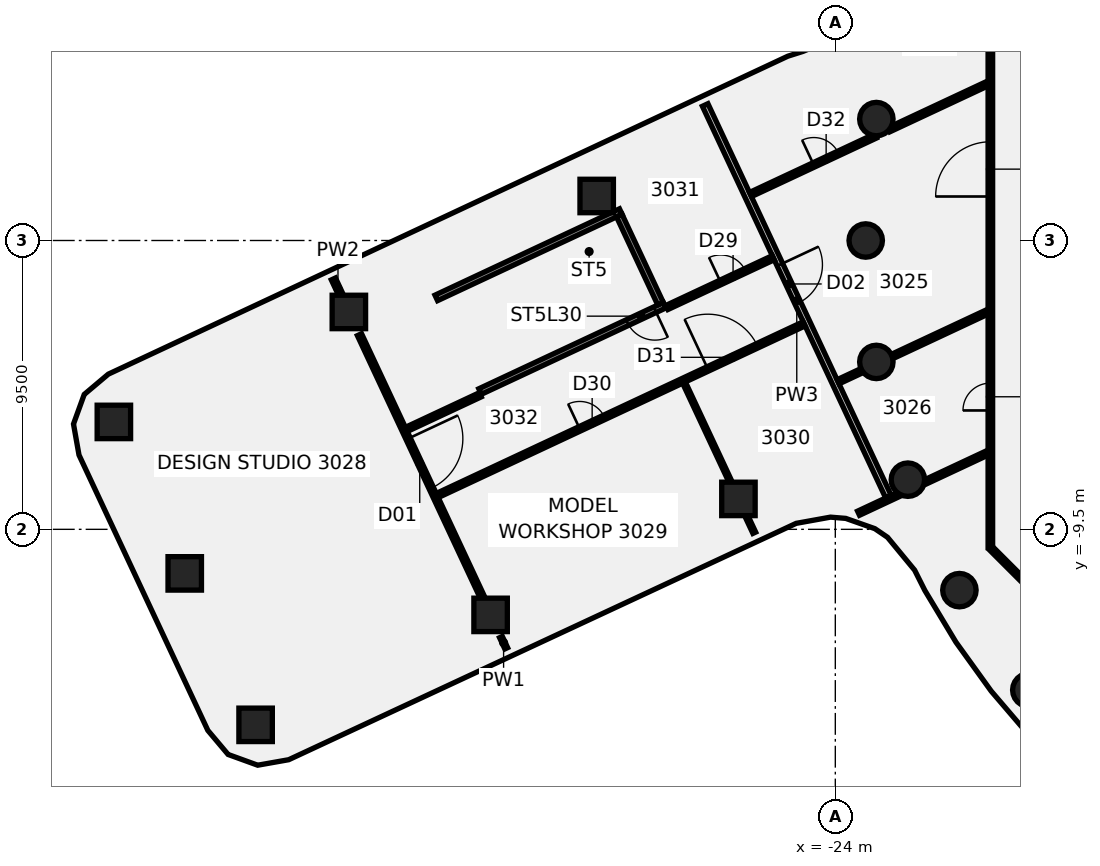
"""IFC4 building model, lengths in metres.
Left out: names, types, materials, properties, quantities, classifications, styles, units other than length and angle.
Written with IfcOpenShell. Run it as: python <this file> out.ifc"""

import sys

from ifc_helpers import new_model, si_unit, direction, frame, frame_2d, origin, origin_2d, place, context, subcontext, project, spatial, polyline, rectangle, circle, outline, extrude, element, fill, save


model = new_model("IFC4")
c1 = context("Model", 3, precision=1e-05, world=origin(), true_north=direction((0.0, 1.0)))
c2 = subcontext(c1, "Body", "Model", "MODEL_VIEW")
j1 = project(units=[si_unit("LENGTHUNIT", "METRE"), si_unit("PLANEANGLEUNIT", "RADIAN")], contexts=[c1])
p1 = place(None, origin())
s1 = spatial("IfcSite", under=j1, at=p1, CompositionType="ELEMENT")
p2 = place(p1, origin())
s2 = spatial("IfcBuilding", under=s1, at=p2, CompositionType="ELEMENT")
p3 = place(p2, frame((0.0, 0.0, 124.75)))
s3 = spatial("IfcBuildingStorey", under=s2, at=p3, CompositionType="ELEMENT", Elevation=124.75)
for number, where, z_axis, x_axis in (
    (1, (-22.651, 3.994, -0.14), (0.0, 0.0, 1.0), (1.0, 0.0, 0.0)),
    (2, (-23.0, 0.0, -0.14), (0.0, 0.0, 1.0), (1.0, 0.0, 0.0)),
    (3, (-22.651, -3.994, -0.14), (0.0, 0.0, 1.0), (1.0, 0.0, 0.0)),
    (4, (-21.613, -7.866, -0.14), (0.0, 0.0, 1.0), (1.0, 0.0, 0.0)),
    (5, (-19.919, -11.5, -0.14), (0.0, 0.0, 1.0), (1.0, 0.0, 0.0)),
    (6, (-17.619, -14.784, -0.14), (0.0, 0.0, 1.0), (1.0, 0.0, 0.0)),
):
    element("IfcColumn", number, at=place(p3, frame(where, z_axis=z_axis, x_axis=x_axis)), inside=s3, PredefinedType="COLUMN", context=c2, shape_type="SweptSolid", body=[
        extrude(circle(Radius=0.55, at=origin_2d()), origin(), (0.0, 0.0, 1.0), 3.71),
    ])
p4 = place(p3, frame((-35.338, -12.314, -0.138), z_axis=(0.060824433029, -0.064699855868, 0.9960493547), x_axis=(-0.421197702581, 0.903035286049, 0.084378714676)))
e7 = element("IfcColumn", 7, at=p4, inside=s3, PredefinedType="COLUMN", context=c2, shape_type="SweptSolid", body=[
    extrude(rectangle(XDim=1.1, YDim=1.1, at=origin_2d()), origin(), (0.0, 0.0, 1.0), 3.717),
])
p5 = place(p3, frame((-40.0, -2.35, -0.138), z_axis=(0.012351142794, -0.088034741194, 0.996040829291), x_axis=(0.905727436668, 0.423052547946, 0.026160125068)))
e8 = element("IfcColumn", 8, at=p5, inside=s3, PredefinedType="COLUMN", context=c2, shape_type="SweptSolid", body=[
    extrude(rectangle(XDim=1.1, YDim=1.1, at=origin_2d()), origin(), (0.0, 0.0, 1.0), 3.716),
])
p6 = place(p3, frame((-27.187, -8.499, -0.139), z_axis=(0.041932325564, -0.025080401947, 0.998805613476), x_axis=(-0.422762183328, 0.905336041768, 0.040481944421)))
e9 = element("IfcColumn", 9, at=p6, inside=s3, PredefinedType="COLUMN", context=c2, shape_type="SweptSolid", body=[
    extrude(rectangle(XDim=1.1, YDim=1.1, at=origin_2d()), origin(), (0.0, 0.0, 1.0), 3.709),
])
p7 = place(p3, frame((-31.849, 1.464, -0.139), z_axis=(-0.00678071338, -0.048386644022, 0.998805664084), x_axis=(0.905990074096, 0.422461295082, 0.026616532396)))
e10 = element("IfcColumn", 10, at=p7, inside=s3, PredefinedType="COLUMN", context=c2, shape_type="SweptSolid", body=[
    extrude(rectangle(XDim=1.1, YDim=1.1, at=origin_2d()), origin(), (0.0, 0.0, 1.0), 3.708),
])
p8 = place(p3, frame((-47.73, -5.967, -0.138), z_axis=(0.019038669148, -0.130588259864, 0.991253870339), x_axis=(0.905941901453, 0.421679598548, 0.038152160609)))
e11 = element("IfcColumn", 11, at=p8, inside=s3, PredefinedType="COLUMN", context=c2, shape_type="SweptSolid", body=[
    extrude(rectangle(XDim=1.1, YDim=1.1, at=origin_2d()), origin(), (0.0, 0.0, 1.0), 3.732),
])
p9 = place(p3, frame((-45.399, -10.949, -0.138), z_axis=(0.043196128411, -0.119116596528, 0.991940185153), x_axis=(0.905970442825, 0.423188341029, 0.011365946715)))
e12 = element("IfcColumn", 12, at=p9, inside=s3, PredefinedType="COLUMN", context=c2, shape_type="SweptSolid", body=[
    extrude(rectangle(XDim=1.1, YDim=1.1, at=origin_2d()), origin(), (0.0, 0.0, 1.0), 3.73),
])
p10 = place(p3, frame((-43.068, -15.93, -0.138), z_axis=(0.067336464177, -0.107515850964, 0.991920431478), x_axis=(-0.419376139534, 0.899037513011, 0.125917448308)))
e13 = element("IfcColumn", 13, at=p10, inside=s3, PredefinedType="COLUMN", context=c2, shape_type="SweptSolid", body=[
    extrude(rectangle(XDim=1.1, YDim=1.1, at=origin_2d()), origin(), (0.0, 0.0, 1.0), 3.731),
])
p11 = place(p3, frame((-40.509, -1.264, 0.0), z_axis=(0.0, 0.0, 1.0), x_axis=(0.423771735818, -0.905769019078, 0.0)))
e14 = element("IfcWall", 14, at=p11, inside=s3, PredefinedType="PARTITIONING", context=c2, shape_type="SweptSolid", body=[
    extrude(rectangle(XDim=0.709, YDim=0.15, at=frame_2d((0.354, 0.0))), origin(), (0.0, 0.0, 1.0), 2.97),
])
p12 = place(p3, frame((-39.651, -3.097, 0.0), z_axis=(0.0, 0.0, 1.0), x_axis=(0.423775684495, -0.905767171646, 0.0)))
e15 = element("IfcWall", 15, at=p12, inside=s3, PredefinedType="PARTITIONING", context=c2, shape_type="SweptSolid", body=[
    extrude(rectangle(XDim=9.667, YDim=0.15, at=frame_2d((4.833, 0.0))), origin(), (0.0, 0.0, 1.0), 2.87),
])
p13 = place(p12, frame((3.776, 0.0, 0.0)))
e16 = element("IfcOpeningElement", 16, at=p13, cuts=e15, PredefinedType="OPENING", context=c2, shape_type="SweptSolid", body=[
    extrude(rectangle(XDim=1.8, YDim=2.1, at=frame_2d((0.9, 1.05))), frame((0.0, 0.085, 0.0), z_axis=(0.0, -1.0, 0.0), x_axis=(1.0, 0.0, 0.0)), (0.0, 0.0, 1.0), 0.17),
])
p14 = place(p3, frame((-34.998, -13.043, 0.0), z_axis=(0.0, 0.0, 1.0), x_axis=(0.423605928127, -0.905846575119, 0.0)))
e17 = element("IfcWall", 17, at=p14, inside=s3, PredefinedType="PARTITIONING", context=c2, shape_type="SweptSolid", body=[
    extrude(rectangle(XDim=0.408, YDim=0.1, at=frame_2d((0.204, 0.0))), origin(), (0.0, 0.0, 1.0), 2.97),
])
p15 = place(p3, frame((-28.977, -4.673, 0.0), z_axis=(0.0, 0.0, 1.0), x_axis=(0.423841599809, -0.905736329332, 0.0)))
e18 = element("IfcWall", 18, at=p15, inside=s3, PredefinedType="PARTITIONING", context=c2, shape_type="SweptSolid", body=[
    extrude(rectangle(XDim=3.634, YDim=0.1, at=frame_2d((1.817, 0.0))), origin(), (0.0, 0.0, 1.0), 2.97),
])
p16 = place(p3, frame((-26.88, -9.155, 0.0), z_axis=(0.0, 0.0, 1.0), x_axis=(0.423519130121, -0.905887159872, 0.0)))
e19 = element("IfcWall", 19, at=p16, inside=s3, PredefinedType="PARTITIONING", context=c2, shape_type="SweptSolid", body=[
    extrude(rectangle(XDim=0.506, YDim=0.1, at=frame_2d((0.253, 0.0))), origin(), (0.0, 0.0, 1.0), 2.97),
])
p17 = place(p3, frame((-28.281, 4.457, 0.0), z_axis=(0.0, 0.0, 1.0), x_axis=(0.423799855828, -0.90575586236, 0.0)))
e20 = element("IfcWall", 20, at=p17, inside=s3, PredefinedType="PARTITIONING", context=c2, shape_type="SweptSolid", body=[
    extrude(rectangle(XDim=14.219, YDim=0.2, at=frame_2d((7.109, 0.0))), origin(), (0.0, 0.0, 1.0), 2.87),
])
p18 = place(p17, frame((5.8, 0.0, 0.0)))
e21 = element("IfcOpeningElement", 21, at=p18, cuts=e20, PredefinedType="OPENING", context=c2, shape_type="SweptSolid", body=[
    extrude(rectangle(XDim=1.4, YDim=2.1, at=frame_2d((0.7, 1.05))), frame((0.0, 0.11, 0.0), z_axis=(0.0, -1.0, 0.0), x_axis=(1.0, 0.0, 0.0)), (0.0, 0.0, 1.0), 0.22),
])
p19 = place(p3, frame((-18.872, -10.128, 0.0), z_axis=(0.0, 0.0, 1.0), x_axis=(0.707106781187, -0.707106781187, 0.0)))
e22 = element("IfcWall", 22, at=p19, inside=s3, PredefinedType="PARTITIONING", context=c2, shape_type="SweptSolid", body=[
    extrude(rectangle(XDim=2.465, YDim=0.15, at=frame_2d((1.232, 0.0))), origin(), (0.0, 0.0, 1.0), 2.97),
])
p20 = place(p3, frame((-38.11, -6.213, 0.0), z_axis=(0.0, 0.0, 1.0), x_axis=(0.905797160648, 0.423711580869, 0.0)))
e23 = element("IfcWall", 23, at=p20, inside=s3, PredefinedType="PARTITIONING", context=c2, shape_type="SweptSolid", body=[
    extrude(rectangle(XDim=2.685, YDim=0.15, at=frame_2d((1.343, 0.0))), origin(), (0.0, 0.0, 1.0), 2.87),
])
p21 = place(p3, frame((-29.537, -2.202, 0.0), z_axis=(0.0, 0.0, 1.0), x_axis=(0.905762554572, 0.423785552768, 0.0)))
e24 = element("IfcWall", 24, at=p21, inside=s3, PredefinedType="PARTITIONING", context=c2, shape_type="SweptSolid", body=[
    extrude(rectangle(XDim=3.86, YDim=0.15, at=frame_2d((1.93, 0.0))), origin(), (0.0, 0.0, 1.0), 2.87),
])
p22 = place(p21, frame((1.95, 0.0, 0.0)))
e25 = element("IfcOpeningElement", 25, at=p22, cuts=e24, PredefinedType="OPENING", context=c2, shape_type="SweptSolid", body=[
    extrude(rectangle(XDim=0.9, YDim=2.1, at=frame_2d((0.45, 1.05))), frame((0.0, 0.085, 0.0), z_axis=(0.0, -1.0, 0.0), x_axis=(1.0, 0.0, 0.0)), (0.0, 0.0, 1.0), 0.17),
])
p23 = place(p3, frame((-37.093, -8.387, 0.0), z_axis=(0.0, 0.0, 1.0), x_axis=(0.905765973865, 0.423778244591, 0.0)))
e26 = element("IfcWall", 26, at=p23, inside=s3, PredefinedType="PARTITIONING", context=c2, shape_type="SweptSolid", body=[
    extrude(rectangle(XDim=13.321, YDim=0.15, at=frame_2d((6.66, 0.0))), origin(), (0.0, 0.0, 1.0), 2.87),
])
p24 = place(p23, frame((5.175, 0.0, 0.0)))
e27 = element("IfcOpeningElement", 27, at=p24, cuts=e26, PredefinedType="OPENING", context=c2, shape_type="SweptSolid", body=[
    extrude(rectangle(XDim=0.9, YDim=2.1, at=frame_2d((0.45, 1.05))), frame((0.0, 0.085, 0.0), z_axis=(0.0, -1.0, 0.0), x_axis=(1.0, 0.0, 0.0)), (0.0, 0.0, 1.0), 0.17),
])
p25 = place(p23, frame((9.825, 0.0, 0.0)))
e28 = element("IfcOpeningElement", 28, at=p25, cuts=e26, PredefinedType="OPENING", context=c2, shape_type="SweptSolid", body=[
    extrude(rectangle(XDim=1.8, YDim=2.1, at=frame_2d((0.9, 1.05))), frame((0.0, 0.085, 0.0), z_axis=(0.0, -1.0, 0.0), x_axis=(1.0, 0.0, 0.0)), (0.0, 0.0, 1.0), 0.17),
])
p26 = place(p3, frame((-26.788, 1.513, 0.0), z_axis=(0.0, 0.0, 1.0), x_axis=(0.905759991445, 0.42379103093, 0.0)))
e29 = element("IfcWall", 29, at=p26, inside=s3, PredefinedType="PARTITIONING", context=c2, shape_type="SweptSolid", body=[
    extrude(rectangle(XDim=4.545, YDim=0.15, at=frame_2d((2.272, 0.0))), origin(), (0.0, 0.0, 1.0), 2.97),
])
p27 = place(p26, frame((2.295, 0.0, 0.0)))
e30 = element("IfcOpeningElement", 30, at=p27, cuts=e29, PredefinedType="OPENING", context=c2, shape_type="SweptSolid", body=[
    extrude(rectangle(XDim=0.9, YDim=2.1, at=frame_2d((0.45, 1.05))), frame((0.0, 0.085, 0.0), z_axis=(0.0, -1.0, 0.0), x_axis=(1.0, 0.0, 0.0)), (0.0, 0.0, 1.0), 0.17),
])
p28 = place(p3, frame((-22.237, 3.643, 0.0), z_axis=(0.0, 0.0, 1.0), x_axis=(0.905759778977, 0.423791485034, 0.0)))
e31 = element("IfcWall", 31, at=p28, inside=s3, PredefinedType="PARTITIONING", context=c2, shape_type="SweptSolid", body=[
    extrude(rectangle(XDim=3.584, YDim=0.15, at=frame_2d((1.792, 0.0))), origin(), (0.0, 0.0, 1.0), 2.97),
])
p29 = place(p3, frame((-23.906, -4.646, 0.0), z_axis=(0.0, 0.0, 1.0), x_axis=(0.905776114627, 0.423756569473, 0.0)))
e32 = element("IfcWall", 32, at=p29, inside=s3, PredefinedType="PARTITIONING", context=c2, shape_type="SweptSolid", body=[
    extrude(rectangle(XDim=0.859, YDim=0.15, at=frame_2d((0.43, 0.0))), origin(), (0.0, 0.0, 1.0), 2.87),
])
p30 = place(p3, frame((-22.138, -3.818, 0.0), z_axis=(0.0, 0.0, 1.0), x_axis=(0.90574646987, 0.423819929118, 0.0)))
e33 = element("IfcWall", 33, at=p30, inside=s3, PredefinedType="PARTITIONING", context=c2, shape_type="SweptSolid", body=[
    extrude(rectangle(XDim=3.475, YDim=0.15, at=frame_2d((1.737, 0.0))), origin(), (0.0, 0.0, 1.0), 2.97),
])
p31 = place(p3, frame((-23.236, -8.969, 0.0), z_axis=(0.0, 0.0, 1.0), x_axis=(0.905683464585, 0.423954551783, 0.0)))
e34 = element("IfcWall", 34, at=p31, inside=s3, PredefinedType="PARTITIONING", context=c2, shape_type="SweptSolid", body=[
    extrude(rectangle(XDim=1.475, YDim=0.15, at=frame_2d((0.737, 0.0))), origin(), (0.0, 0.0, 1.0), 2.97),
])
p32 = place(p3, frame((-21.078, -7.959, 0.0), z_axis=(0.0, 0.0, 1.0), x_axis=(0.905695418717, 0.423929013533, 0.0)))
e35 = element("IfcWall", 35, at=p32, inside=s3, PredefinedType="PARTITIONING", context=c2, shape_type="SweptSolid", body=[
    extrude(rectangle(XDim=2.305, YDim=0.15, at=frame_2d((1.152, 0.0))), origin(), (0.0, 0.0, 1.0), 2.97),
])
p33 = place(p3, frame((-18.9, -10.1, 0.0), z_axis=(0.0, 0.0, 1.0), x_axis=(0.0, 1.0, 0.0)))
e36 = element("IfcWall", 36, at=p33, inside=s3, PredefinedType="PARTITIONING", context=c2, shape_type="SweptSolid", body=[
    extrude(rectangle(XDim=20.2, YDim=0.15, at=frame_2d((10.1, 0.0))), origin(), (0.0, 0.0, 1.0), 2.97),
])
p34 = place(p33, frame((11.547, 0.0, 0.0)))
e37 = element("IfcOpeningElement", 37, at=p34, cuts=e36, PredefinedType="OPENING", context=c2, shape_type="SweptSolid", body=[
    extrude(rectangle(XDim=1.8, YDim=2.1, at=frame_2d((0.9, 1.05))), frame((0.0, 0.085, 0.0), z_axis=(0.0, -1.0, 0.0), x_axis=(1.0, 0.0, 0.0)), (0.0, 0.0, 1.0), 0.17),
])
p35 = place(p33, frame((4.51, 0.0, 0.0)))
e38 = element("IfcOpeningElement", 38, at=p35, cuts=e36, PredefinedType="OPENING", context=c2, shape_type="SweptSolid", body=[
    extrude(rectangle(XDim=0.9, YDim=2.1, at=frame_2d((0.45, 1.05))), frame((0.0, 0.085, 0.0), z_axis=(0.0, -1.0, 0.0), x_axis=(1.0, 0.0, 0.0)), (0.0, 0.0, 1.0), 0.17),
])
p36 = place(p3, frame((-29.616, -2.128, -0.14), z_axis=(0.0, 0.0, 1.0), x_axis=(-0.90574886028, -0.42381482053, 0.0)))
e39 = element("IfcWall", 39, at=p36, inside=s3, PredefinedType="SHEAR", context=c2, shape_type="SweptSolid", body=[
    extrude(rectangle(XDim=6.7, YDim=0.2, at=frame_2d((3.35, 0.0))), origin(), (0.0, 0.0, 1.0), 3.01),
])
p37 = place(p36, frame((0.35, 0.0, 0.0)))
e40 = element("IfcOpeningElement", 40, at=p37, cuts=e39, PredefinedType="OPENING", context=c2, shape_type="SweptSolid", body=[
    extrude(rectangle(XDim=1.0, YDim=2.1, at=frame_2d((0.5, 1.05))), frame((0.0, 0.11, 0.0), z_axis=(0.0, -1.0, 0.0), x_axis=(1.0, 0.0, 0.0)), (0.0, 0.0, 1.0), 0.22),
])
p38 = place(p3, frame((-31.057, 0.951, -0.14), z_axis=(0.0, 0.0, 1.0), x_axis=(-0.90574231493, -0.423828808535, 0.0)))
e41 = element("IfcWall", 41, at=p38, inside=s3, PredefinedType="SHEAR", context=c2, shape_type="SweptSolid", body=[
    extrude(rectangle(XDim=6.7, YDim=0.2, at=frame_2d((3.35, 0.0))), origin(), (0.0, 0.0, 1.0), 3.01),
])
p39 = place(p3, frame((-31.105, 0.818, -0.14), z_axis=(0.0, 0.0, 1.0), x_axis=(0.423808281325, -0.905751920053, 0.0)))
e42 = element("IfcWall", 42, at=p39, inside=s3, PredefinedType="SHEAR", context=c2, shape_type="SweptSolid", body=[
    extrude(rectangle(XDim=3.2, YDim=0.2, at=frame_2d((1.6, 0.0))), origin(), (0.0, 0.0, 1.0), 3.01),
])
p40 = place(p3, frame((0.0, 0.0, -0.14)))
e43 = element("IfcWall", 43, at=p40, inside=s3, PredefinedType="SHEAR", context=c2, shape_type="SweptSolid", body=[
    extrude(outline(polyline([(-36.902, -1.894), (-37.083, -1.979), (-35.727, -4.877), (-35.546, -4.792), (-36.902, -1.894)])), origin(), (0.0, 0.0, 1.0), 3.01),
])
p41 = place(p13, frame((1.8, 0.0, 0.0), z_axis=(0.0, 0.0, 1.0), x_axis=(-1.0, 0.0, 0.0)))
e44 = element("IfcDoor", 44, at=p41, inside=s3, OperationType="DOUBLE_DOOR_SINGLE_SWING", PredefinedType="DOOR", context=c2, shape_type="SweptSolid", body=[
    extrude(rectangle(XDim=1.8, YDim=2.1, at=frame_2d((0.9, 1.05))), frame((0.0, 0.025, 0.0), z_axis=(0.0, -1.0, 0.0), x_axis=(1.0, 0.0, 0.0)), (0.0, 0.0, 1.0), 0.05),
])
fill(e16, e44)
p42 = place(p18, origin())
e45 = element("IfcDoor", 45, at=p42, inside=s3, OperationType="DOUBLE_DOOR_SINGLE_SWING", PredefinedType="DOOR", context=c2, shape_type="SweptSolid", body=[
    extrude(rectangle(XDim=1.4, YDim=2.1, at=frame_2d((0.7, 1.05))), frame((0.0, 0.025, 0.0), z_axis=(0.0, -1.0, 0.0), x_axis=(1.0, 0.0, 0.0)), (0.0, 0.0, 1.0), 0.05),
])
fill(e21, e45)
p43 = place(p22, origin())
e46 = element("IfcDoor", 46, at=p43, inside=s3, OperationType="SINGLE_SWING_LEFT", PredefinedType="DOOR", context=c2, shape_type="SweptSolid", body=[
    extrude(rectangle(XDim=0.9, YDim=2.1, at=frame_2d((0.45, 1.05))), frame((0.0, 0.025, 0.0), z_axis=(0.0, -1.0, 0.0), x_axis=(1.0, 0.0, 0.0)), (0.0, 0.0, 1.0), 0.05),
])
fill(e25, e46)
p44 = place(p24, frame((0.9, 0.0, 0.0), z_axis=(0.0, 0.0, 1.0), x_axis=(-1.0, 0.0, 0.0)))
e47 = element("IfcDoor", 47, at=p44, inside=s3, OperationType="SINGLE_SWING_LEFT", PredefinedType="DOOR", context=c2, shape_type="SweptSolid", body=[
    extrude(rectangle(XDim=0.9, YDim=2.1, at=frame_2d((0.45, 1.05))), frame((0.0, 0.025, 0.0), z_axis=(0.0, -1.0, 0.0), x_axis=(1.0, 0.0, 0.0)), (0.0, 0.0, 1.0), 0.05),
])
fill(e27, e47)
p45 = place(p25, frame((1.8, 0.0, 0.0), z_axis=(0.0, 0.0, 1.0), x_axis=(-1.0, 0.0, 0.0)))
e48 = element("IfcDoor", 48, at=p45, inside=s3, OperationType="DOUBLE_DOOR_SINGLE_SWING", PredefinedType="DOOR", context=c2, shape_type="SweptSolid", body=[
    extrude(rectangle(XDim=1.8, YDim=2.1, at=frame_2d((0.9, 1.05))), frame((0.0, 0.025, 0.0), z_axis=(0.0, -1.0, 0.0), x_axis=(1.0, 0.0, 0.0)), (0.0, 0.0, 1.0), 0.05),
])
fill(e28, e48)
p46 = place(p27, origin())
e49 = element("IfcDoor", 49, at=p46, inside=s3, OperationType="SINGLE_SWING_LEFT", PredefinedType="DOOR", context=c2, shape_type="SweptSolid", body=[
    extrude(rectangle(XDim=0.9, YDim=2.1, at=frame_2d((0.45, 1.05))), frame((0.0, 0.025, 0.0), z_axis=(0.0, -1.0, 0.0), x_axis=(1.0, 0.0, 0.0)), (0.0, 0.0, 1.0), 0.05),
])
fill(e30, e49)
p47 = place(p34, frame((1.8, 0.0, 0.0), z_axis=(0.0, 0.0, 1.0), x_axis=(-1.0, 0.0, 0.0)))
e50 = element("IfcDoor", 50, at=p47, inside=s3, OperationType="DOUBLE_DOOR_SINGLE_SWING", PredefinedType="DOOR", context=c2, shape_type="SweptSolid", body=[
    extrude(rectangle(XDim=1.8, YDim=2.1, at=frame_2d((0.9, 1.05))), frame((0.0, 0.025, 0.0), z_axis=(0.0, -1.0, 0.0), x_axis=(1.0, 0.0, 0.0)), (0.0, 0.0, 1.0), 0.05),
])
fill(e37, e50)
p48 = place(p35, origin())
e51 = element("IfcDoor", 51, at=p48, inside=s3, OperationType="SINGLE_SWING_RIGHT", PredefinedType="DOOR", context=c2, shape_type="SweptSolid", body=[
    extrude(rectangle(XDim=0.9, YDim=2.1, at=frame_2d((0.45, 1.05))), frame((0.0, 0.025, 0.0), z_axis=(0.0, -1.0, 0.0), x_axis=(1.0, 0.0, 0.0)), (0.0, 0.0, 1.0), 0.05),
])
fill(e38, e51)
p49 = place(p37, origin())
e52 = element("IfcDoor", 52, at=p49, inside=s3, OperationType="SINGLE_SWING_LEFT", PredefinedType="DOOR", context=c2, shape_type="SweptSolid", body=[
    extrude(rectangle(XDim=1.0, YDim=2.1, at=frame_2d((0.5, 1.05))), frame((0.0, 0.025, 0.0), z_axis=(0.0, -1.0, 0.0), x_axis=(1.0, 0.0, 0.0)), (0.0, 0.0, 1.0), 0.05),
])
fill(e40, e52)
save(model, sys.argv[1])
